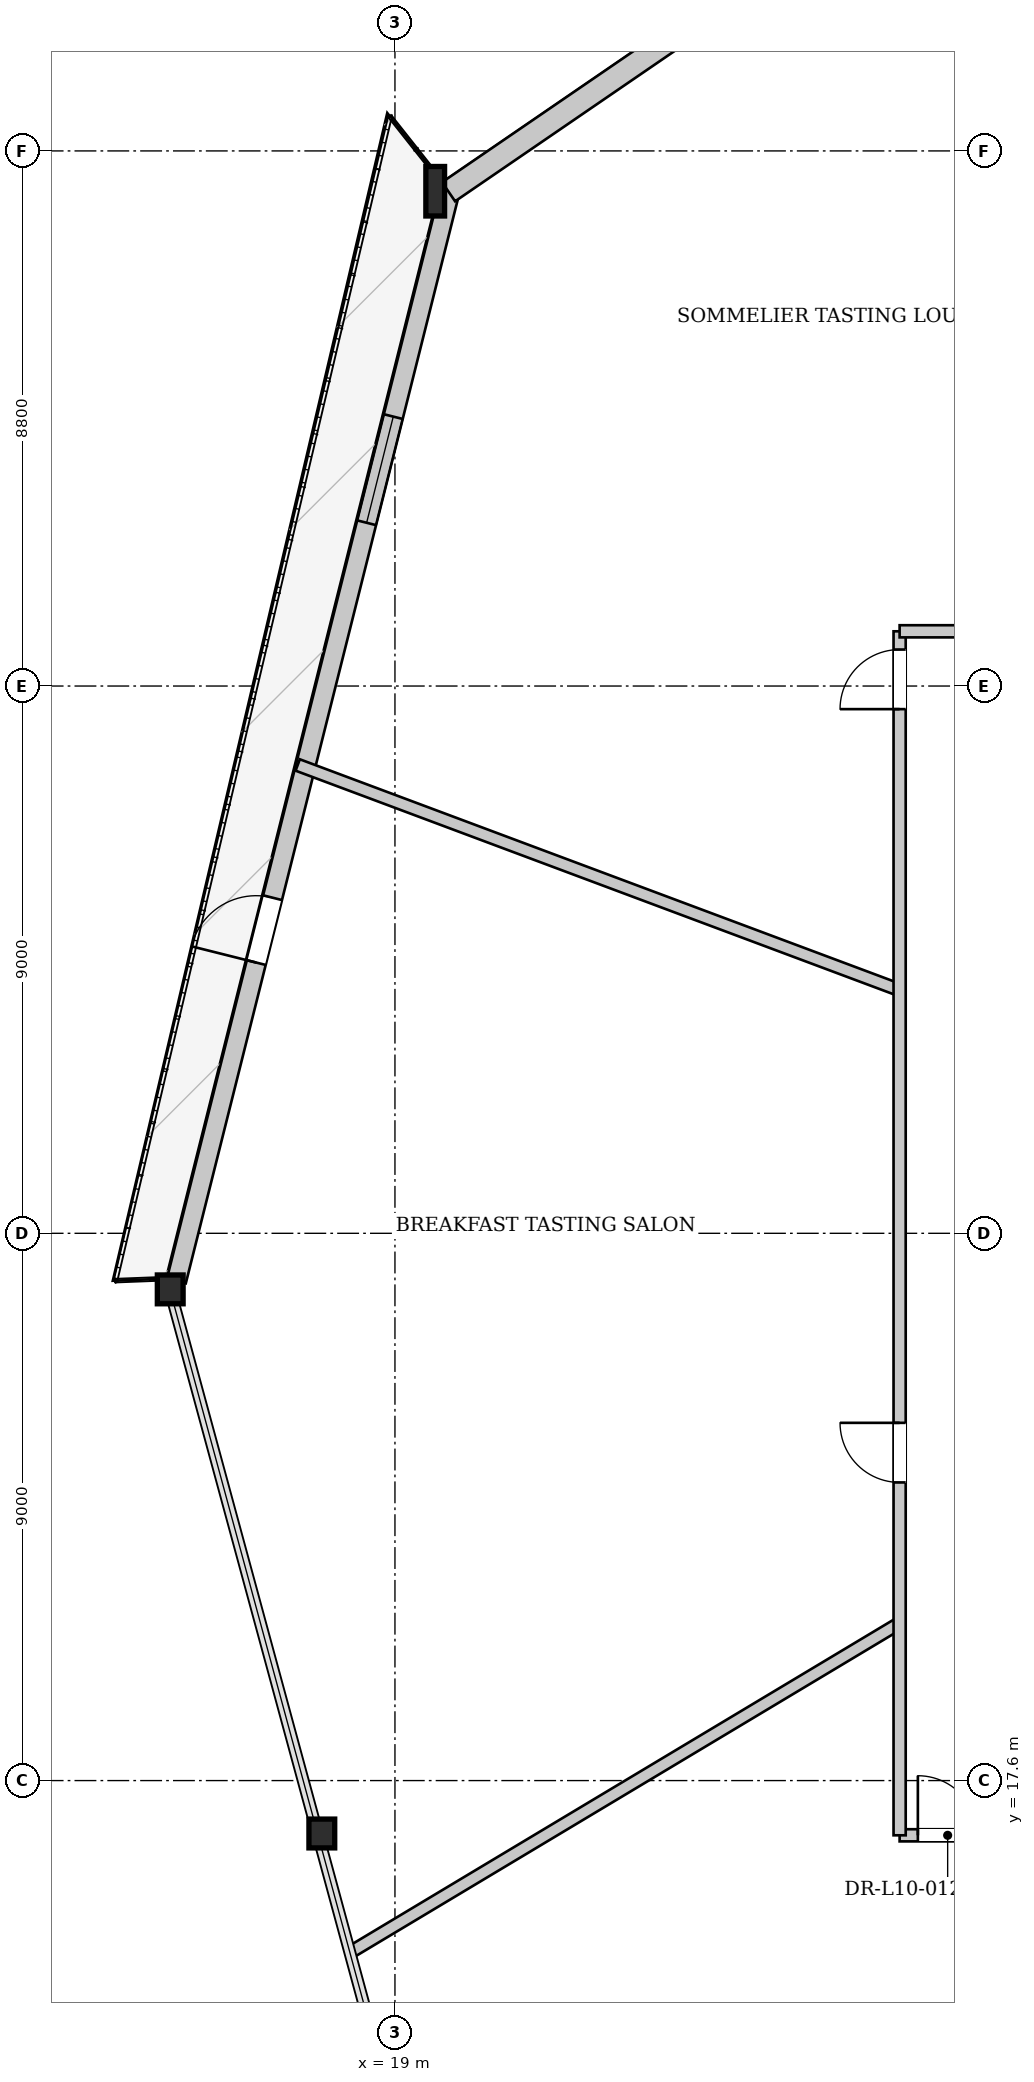
"""IFC4 building model, lengths in metres.
Left out: names, types, materials, properties, quantities, classifications, styles, units other than length and angle.
Written with IfcOpenShell. Run it as: python <this file> out.ifc"""

import sys

from ifc_helpers import new_model, si_unit, direction, frame, frame_2d, origin, origin_2d, place, context, subcontext, project, spatial, rectangle, i_section, extrude, source, transform, mapped, element, fill, save


model = new_model("IFC4")
c1 = context("Model", 3, precision=1e-05, world=origin(), true_north=direction((0.0, 1.0)))
c2 = subcontext(c1, "Body", "Model", "MODEL_VIEW")
j1 = project(units=[si_unit("LENGTHUNIT", "METRE"), si_unit("PLANEANGLEUNIT", "RADIAN")], contexts=[c1])
p1 = place(None, origin())
s1 = spatial("IfcSite", under=j1, at=p1, CompositionType="ELEMENT")
p2 = place(p1, origin())
s2 = spatial("IfcBuilding", under=s1, at=p2, CompositionType="ELEMENT")
p3 = place(p2, frame((0.0, 0.0, 43.5)))
s3 = spatial("IfcBuildingStorey", under=s2, at=p3, CompositionType="ELEMENT", Elevation=43.5)
m1 = source(origin(), c2, "Body", "SweptSolid", [
    extrude(i_section(OverallWidth=0.308, OverallDepth=0.814, WebThickness=0.021, FlangeThickness=0.04, at=origin_2d()), origin(), (0.0, 0.0, 1.0), 3.405),
])
p4 = place(p3, frame((19.775, 43.885, 0.0), z_axis=(-0.06610046302, -0.086962973583, 0.994016181968), x_axis=(0.796124250752, -0.605133189772, 0.0)))
e1 = element("IfcColumn", 1, at=p4, inside=s3, PredefinedType="COLUMN", context=c2, shape_type="MappedRepresentation", body=[
    mapped(m1, transform((0.0, 0.0, 0.0), x_axis=(1.0, 0.0, 0.0), y_axis=(0.0, 1.0, 0.0), z_axis=(0.0, 0.0, 1.0), scale=1.0)),
])
m2 = source(origin(), c2, "Body", "SweptSolid", [
    extrude(i_section(OverallWidth=0.424, OverallDepth=0.474, WebThickness=0.043, FlangeThickness=0.068, at=origin_2d()), origin(), (0.0, 0.0, 1.0), 3.405),
])
p5 = place(p3, frame((15.25, 25.854, 0.0), z_axis=(0.031905343167, -0.103817835743, 0.9940844562), x_axis=(0.955878866241, 0.293761115661, 0.0)))
e2 = element("IfcColumn", 2, at=p5, inside=s3, PredefinedType="COLUMN", context=c2, shape_type="MappedRepresentation", body=[
    mapped(m2, transform((0.0, 0.0, 0.0), x_axis=(1.0, 0.0, 0.0), y_axis=(0.0, 1.0, 0.0), z_axis=(0.0, 0.0, 1.0), scale=1.0)),
])
m3 = source(origin(), c2, "Body", "SweptSolid", [
    extrude(i_section(OverallWidth=0.424, OverallDepth=0.474, WebThickness=0.043, FlangeThickness=0.068, at=origin_2d()), origin(), (0.0, 0.0, 1.0), 3.406),
])
p6 = place(p3, frame((17.685, 16.885, 0.0), z_axis=(0.065720082307, -0.090947420336, 0.993684777742), x_axis=(0.810527620102, 0.585700415787, 0.0)))
e3 = element("IfcColumn", 3, at=p6, inside=s3, PredefinedType="COLUMN", context=c2, shape_type="MappedRepresentation", body=[
    mapped(m3, transform((0.0, 0.0, 0.0), x_axis=(1.0, 0.0, 0.0), y_axis=(0.0, 1.0, 0.0), z_axis=(0.0, 0.0, 1.0), scale=1.0)),
])
p7 = place(p3, frame((15.405, 25.816, 0.0), z_axis=(0.0, 0.0, 1.0), x_axis=(0.243422395621, 0.969920376789, 0.0)))
e4 = element("IfcWall", 4, at=p7, inside=s3, PredefinedType="SOLIDWALL", context=c2, shape_type="SweptSolid", body=[
    extrude(rectangle(XDim=18.59, YDim=0.32, at=frame_2d((9.295, 0.0))), origin(), (0.0, 0.0, 1.0), 2.592),
])
p8 = place(p7, frame((5.399, 0.0, 0.0)))
e5 = element("IfcOpeningElement", 5, at=p8, cuts=e4, PredefinedType="OPENING", context=c2, shape_type="SweptSolid", body=[
    extrude(rectangle(XDim=1.1, YDim=2.3, at=frame_2d((0.55, 1.15))), frame((0.0, 0.17, 0.0), z_axis=(0.0, -1.0, 0.0), x_axis=(1.0, 0.0, 0.0)), (0.0, 0.0, 1.0), 0.34),
])
p9 = place(p7, frame((12.856, 0.0, 0.272)))
e6 = element("IfcOpeningElement", 6, at=p9, cuts=e4, PredefinedType="OPENING", context=c2, shape_type="SweptSolid", body=[
    extrude(rectangle(XDim=1.8, YDim=2.2, at=frame_2d((0.9, 1.1))), frame((0.0, 0.17, 0.0), z_axis=(0.0, -1.0, 0.0), x_axis=(1.0, 0.0, 0.0)), (0.0, 0.0, 1.0), 0.34),
])
p10 = place(p3, frame((19.882, 43.728, 0.0), z_axis=(0.0, 0.0, 1.0), x_axis=(0.825091616756, 0.564998959255, 0.0)))
e7 = element("IfcWall", 7, at=p10, inside=s3, PredefinedType="SOLIDWALL", context=c2, shape_type="SweptSolid", body=[
    extrude(rectangle(XDim=6.472, YDim=0.38, at=frame_2d((3.236, 0.0))), origin(), (0.0, 0.0, 1.0), 2.592),
])
p11 = place(p3, frame((27.3, 30.601, 0.0), z_axis=(0.0, 0.0, 1.0), x_axis=(-0.936674280528, 0.350201787827, 0.0)))
e8 = element("IfcWall", 8, at=p11, inside=s3, PredefinedType="PARTITIONING", context=c2, shape_type="SweptSolid", body=[
    extrude(rectangle(XDim=10.569, YDim=0.2, at=frame_2d((5.284, 0.0))), origin(), (0.0, 0.0, 1.0), 3.3),
])
p12 = place(p3, frame((27.3, 20.189, 0.0), z_axis=(0.0, 0.0, 1.0), x_axis=(-0.857808451078, -0.51396951394, 0.0)))
e9 = element("IfcWall", 9, at=p12, inside=s3, PredefinedType="PARTITIONING", context=c2, shape_type="SweptSolid", body=[
    extrude(rectangle(XDim=10.509, YDim=0.2, at=frame_2d((5.254, 0.0))), origin(), (0.0, 0.0, 1.0), 3.3),
])
p13 = place(p3, frame((27.3, 16.7, 0.0), z_axis=(0.0, 0.0, 1.0), x_axis=(1.0, 0.0, 0.0)))
e10 = element("IfcWall", 10, at=p13, inside=s3, PredefinedType="PARTITIONING", context=c2, shape_type="SweptSolid", body=[
    extrude(rectangle(XDim=21.4, YDim=0.2, at=frame_2d((10.7, 0.0))), origin(), (0.0, 0.0, 1.0), 3.3),
])
p14 = place(p13, frame((12.99, 0.0, 0.0)))
e11 = element("IfcOpeningElement", 11, at=p14, cuts=e10, PredefinedType="OPENING", context=c2, shape_type="SweptSolid", body=[
    extrude(rectangle(XDim=0.98, YDim=2.15, at=frame_2d((0.49, 1.075))), frame((0.0, 0.11, 0.0), z_axis=(0.0, -1.0, 0.0), x_axis=(1.0, 0.0, 0.0)), (0.0, 0.0, 1.0), 0.22),
])
p15 = place(p13, frame((20.12, 0.0, 0.0)))
e12 = element("IfcOpeningElement", 12, at=p15, cuts=e10, PredefinedType="OPENING", context=c2, shape_type="SweptSolid", body=[
    extrude(rectangle(XDim=0.98, YDim=2.15, at=frame_2d((0.49, 1.075))), frame((0.0, 0.11, 0.0), z_axis=(0.0, -1.0, 0.0), x_axis=(1.0, 0.0, 0.0)), (0.0, 0.0, 1.0), 0.22),
])
p16 = place(p13, frame((0.3, 0.0, 0.0)))
e13 = element("IfcOpeningElement", 13, at=p16, cuts=e10, PredefinedType="OPENING", context=c2, shape_type="SweptSolid", body=[
    extrude(rectangle(XDim=0.98, YDim=2.15, at=frame_2d((0.49, 1.075))), frame((0.0, 0.11, 0.0), z_axis=(0.0, -1.0, 0.0), x_axis=(1.0, 0.0, 0.0)), (0.0, 0.0, 1.0), 0.22),
])
p17 = place(p3, frame((27.3, 16.7, 0.0), z_axis=(0.0, 0.0, 1.0), x_axis=(0.0, 1.0, 0.0)))
e14 = element("IfcWall", 14, at=p17, inside=s3, PredefinedType="PARTITIONING", context=c2, shape_type="SweptSolid", body=[
    extrude(rectangle(XDim=19.8, YDim=0.2, at=frame_2d((9.9, 0.0))), origin(), (0.0, 0.0, 1.0), 3.3),
])
p18 = place(p17, frame((18.52, 0.0, 0.0)))
e15 = element("IfcOpeningElement", 15, at=p18, cuts=e14, PredefinedType="OPENING", context=c2, shape_type="SweptSolid", body=[
    extrude(rectangle(XDim=0.98, YDim=2.15, at=frame_2d((0.49, 1.075))), frame((0.0, 0.11, 0.0), z_axis=(0.0, -1.0, 0.0), x_axis=(1.0, 0.0, 0.0)), (0.0, 0.0, 1.0), 0.22),
])
p19 = place(p17, frame((5.803, 0.0, 0.0)))
e16 = element("IfcOpeningElement", 16, at=p19, cuts=e14, PredefinedType="OPENING", context=c2, shape_type="SweptSolid", body=[
    extrude(rectangle(XDim=0.98, YDim=2.15, at=frame_2d((0.49, 1.075))), frame((0.0, 0.11, 0.0), z_axis=(0.0, -1.0, 0.0), x_axis=(1.0, 0.0, 0.0)), (0.0, 0.0, 1.0), 0.22),
])
p20 = place(p3, frame((27.3, 36.5, 0.0), z_axis=(0.0, 0.0, 1.0), x_axis=(1.0, 0.0, 0.0)))
e17 = element("IfcWall", 17, at=p20, inside=s3, PredefinedType="PARTITIONING", context=c2, shape_type="SweptSolid", body=[
    extrude(rectangle(XDim=21.4, YDim=0.2, at=frame_2d((10.7, 0.0))), origin(), (0.0, 0.0, 1.0), 3.3),
])
p21 = place(p20, frame((20.12, 0.0, 0.0)))
e18 = element("IfcOpeningElement", 18, at=p21, cuts=e17, PredefinedType="OPENING", context=c2, shape_type="SweptSolid", body=[
    extrude(rectangle(XDim=0.98, YDim=2.15, at=frame_2d((0.49, 1.075))), frame((0.0, 0.11, 0.0), z_axis=(0.0, -1.0, 0.0), x_axis=(1.0, 0.0, 0.0)), (0.0, 0.0, 1.0), 0.22),
])
p22 = place(p20, frame((12.385, 0.0, 0.0)))
e19 = element("IfcOpeningElement", 19, at=p22, cuts=e17, PredefinedType="OPENING", context=c2, shape_type="SweptSolid", body=[
    extrude(rectangle(XDim=0.98, YDim=2.15, at=frame_2d((0.49, 1.075))), frame((0.0, 0.11, 0.0), z_axis=(0.0, -1.0, 0.0), x_axis=(1.0, 0.0, 0.0)), (0.0, 0.0, 1.0), 0.22),
])
m4 = source(origin(), c2, "Body", "SweptSolid", [
    extrude(rectangle(XDim=1.1, YDim=2.3, at=frame_2d((0.55, 1.15))), frame((0.0, 0.025, 0.0), z_axis=(0.0, -1.0, 0.0), x_axis=(1.0, 0.0, 0.0)), (0.0, 0.0, 1.0), 0.05),
])
p23 = place(p8, origin())
e20 = element("IfcDoor", 20, at=p23, inside=s3, OperationType="SINGLE_SWING_LEFT", PredefinedType="DOOR", context=c2, shape_type="MappedRepresentation", body=[
    mapped(m4, transform((0.0, 0.0, 0.0), x_axis=(1.0, 0.0, 0.0), y_axis=(0.0, 1.0, 0.0), z_axis=(0.0, 0.0, 1.0), scale=1.0)),
])
fill(e5, e20)
m5 = source(origin(), c2, "Body", "SweptSolid", [
    extrude(rectangle(XDim=1.8, YDim=2.2, at=frame_2d((0.9, 1.1))), frame((0.0, 0.03, 0.0), z_axis=(0.0, -1.0, 0.0), x_axis=(1.0, 0.0, 0.0)), (0.0, 0.0, 1.0), 0.06),
])
p24 = place(p9, origin())
e21 = element("IfcWindow", 21, at=p24, inside=s3, PartitioningType="SINGLE_PANEL", PredefinedType="WINDOW", context=c2, shape_type="MappedRepresentation", body=[
    mapped(m5, transform((0.0, 0.0, 0.0), x_axis=(1.0, 0.0, 0.0), y_axis=(0.0, 1.0, 0.0), z_axis=(0.0, 0.0, 1.0), scale=1.0)),
])
fill(e6, e21)
m6 = source(origin(), c2, "Body", "SweptSolid", [
    extrude(rectangle(XDim=0.98, YDim=2.15, at=frame_2d((0.49, 1.075))), frame((0.0, 0.025, 0.0), z_axis=(0.0, -1.0, 0.0), x_axis=(1.0, 0.0, 0.0)), (0.0, 0.0, 1.0), 0.05),
])
p25 = place(p16, origin())
e22 = element("IfcDoor", 22, at=p25, inside=s3, OperationType="SINGLE_SWING_LEFT", PredefinedType="DOOR", context=c2, shape_type="MappedRepresentation", body=[
    mapped(m6, transform((0.0, 0.0, 0.0), x_axis=(1.0, 0.0, 0.0), y_axis=(0.0, 1.0, 0.0), z_axis=(0.0, 0.0, 1.0), scale=1.0)),
])
fill(e13, e22)
p26 = place(p18, origin())
e23 = element("IfcDoor", 23, at=p26, inside=s3, OperationType="SINGLE_SWING_LEFT", PredefinedType="DOOR", context=c2, shape_type="MappedRepresentation", body=[
    mapped(m6, transform((0.0, 0.0, 0.0), x_axis=(1.0, 0.0, 0.0), y_axis=(0.0, 1.0, 0.0), z_axis=(0.0, 0.0, 1.0), scale=1.0)),
])
fill(e15, e23)
p27 = place(p19, origin())
e24 = element("IfcDoor", 24, at=p27, inside=s3, OperationType="SINGLE_SWING_RIGHT", PredefinedType="DOOR", context=c2, shape_type="MappedRepresentation", body=[
    mapped(m6, transform((0.0, 0.0, 0.0), x_axis=(1.0, 0.0, 0.0), y_axis=(0.0, 1.0, 0.0), z_axis=(0.0, 0.0, 1.0), scale=1.0)),
])
fill(e16, e24)
save(model, sys.argv[1])
